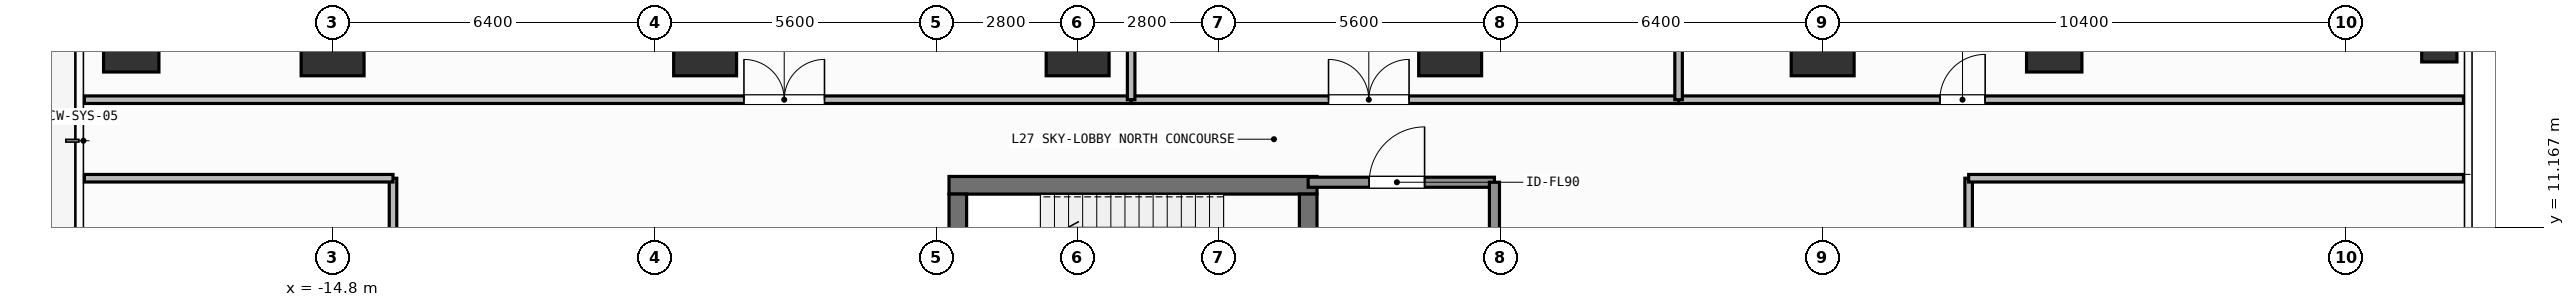
"""IFC4 building model, lengths in metres.
Left out: names, types, materials, properties, quantities, classifications, styles, units other than length and angle.
Written with IfcOpenShell. Run it as: python <this file> out.ifc"""

import sys

from ifc_helpers import new_model, si_unit, direction, frame, frame_2d, origin, origin_2d, place, context, subcontext, project, spatial, rectangle, hollow_rectangle, extrude, element, fill, save


model = new_model("IFC4")
c1 = context("Model", 3, precision=1e-05, world=origin(), true_north=direction((0.0, 1.0)))
c2 = subcontext(c1, "Body", "Model", "MODEL_VIEW")
j1 = project(units=[si_unit("LENGTHUNIT", "METRE"), si_unit("PLANEANGLEUNIT", "RADIAN")], contexts=[c1])
p1 = place(None, origin())
s1 = spatial("IfcSite", under=j1, at=p1, CompositionType="ELEMENT")
p2 = place(p1, origin())
s2 = spatial("IfcBuilding", under=s1, at=p2, CompositionType="ELEMENT")
p3 = place(p2, frame((0.0, 0.0, 108.6)))
s3 = spatial("IfcBuildingStorey", under=s2, at=p3, CompositionType="ELEMENT", Elevation=108.6)
p4 = place(p3, frame((-2.555, 12.0, 0.0), z_axis=(0.0, 0.0, 1.0), x_axis=(1.0, 0.0, 0.0)))
e1 = element("IfcWall", 1, at=p4, inside=s3, PredefinedType="SHEAR", context=c2, shape_type="SweptSolid", body=[
    extrude(rectangle(XDim=7.31, YDim=0.35, at=frame_2d((3.655, 0.0))), origin(), (0.0, 0.0, 1.0), 4.8),
])
p5 = place(p3, frame((-2.38, 8.9, 0.0), z_axis=(0.0, 0.0, 1.0), x_axis=(0.0, 1.0, 0.0)))
e2 = element("IfcWall", 2, at=p5, inside=s3, PredefinedType="SHEAR", context=c2, shape_type="SweptSolid", body=[
    extrude(rectangle(XDim=2.925, YDim=0.35, at=frame_2d((1.462, 0.0))), origin(), (0.0, 0.0, 1.0), 4.8),
])
p6 = place(p3, frame((4.58, 11.825, 0.0), z_axis=(0.0, 0.0, 1.0), x_axis=(0.0, -1.0, 0.0)))
e3 = element("IfcWall", 3, at=p6, inside=s3, PredefinedType="SHEAR", context=c2, shape_type="SweptSolid", body=[
    extrude(rectangle(XDim=2.925, YDim=0.35, at=frame_2d((1.462, 0.0))), origin(), (0.0, 0.0, 1.0), 4.8),
])
p7 = place(p6, frame((0.913, 0.0, 0.0)))
e4 = element("IfcOpeningElement", 4, at=p7, cuts=e3, PredefinedType="OPENING", context=c2, shape_type="SweptSolid", body=[
    extrude(rectangle(XDim=1.1, YDim=2.15, at=frame_2d((0.55, 1.075))), frame((0.0, 0.185, 0.0), z_axis=(0.0, -1.0, 0.0), x_axis=(1.0, 0.0, 0.0)), (0.0, 0.0, 1.0), 0.37),
])
for number, where, z_axis, x_axis in (
    (5, (-14.8, 14.8, 0.0), (0.0, 0.0, 1.0), (1.0, 0.0, 0.0)),
    (6, (-7.4, 14.8, 0.0), (0.0, 0.0, 1.0), (1.0, 0.0, 0.0)),
    (7, (0.0, 14.8, 0.0), (0.0, 0.0, 1.0), (1.0, 0.0, 0.0)),
    (8, (7.4, 14.8, 0.0), (0.0, 0.0, 1.0), (1.0, 0.0, 0.0)),
    (9, (14.8, 14.8, 0.0), (0.0, 0.0, 1.0), (1.0, 0.0, 0.0)),
):
    element("IfcColumn", number, at=place(p3, frame(where, z_axis=z_axis, x_axis=x_axis)), inside=s3, PredefinedType="COLUMN", context=c2, shape_type="SweptSolid", body=[
        extrude(rectangle(XDim=1.25, YDim=1.25, at=origin_2d()), origin(), (0.0, 0.0, 1.0), 4.8),
    ])
for number, where, z_axis, x_axis in (
    (10, (-18.8, 14.8, 0.0), (0.0, 0.0, 1.0), (1.0, 0.0, 0.0)),
    (11, (19.4, 14.8, 0.0), (0.0, 0.0, 1.0), (1.0, 0.0, 0.0)),
):
    element("IfcColumn", number, at=place(p3, frame(where, z_axis=z_axis, x_axis=x_axis)), inside=s3, PredefinedType="COLUMN", context=c2, shape_type="SweptSolid", body=[
        extrude(rectangle(XDim=1.1, YDim=1.1, at=origin_2d()), origin(), (0.0, 0.0, 1.0), 4.8),
    ])
p8 = place(p3, frame((27.05, 14.8, 0.0), z_axis=(0.0, 0.0, 1.0), x_axis=(1.0, 0.0, 0.0)))
e12 = element("IfcColumn", 12, at=p8, inside=s3, PredefinedType="COLUMN", context=c2, shape_type="SweptSolid", body=[
    extrude(hollow_rectangle(XDim=0.7, YDim=0.7, WallThickness=0.032, at=origin_2d()), origin(), (0.0, 0.0, 1.0), 4.8),
])
p9 = place(p3, frame((4.58, 12.06, 0.0), z_axis=(0.0, 0.0, 1.0), x_axis=(1.0, 0.0, 0.0)))
e13 = element("IfcWall", 13, at=p9, inside=s3, PredefinedType="SOLIDWALL", context=c2, shape_type="SweptSolid", body=[
    extrude(rectangle(XDim=3.7, YDim=0.2, at=frame_2d((1.85, 0.0))), origin(), (0.0, 0.0, 1.0), 4.58),
])
p10 = place(p9, frame((1.212, 0.0, 0.0)))
e14 = element("IfcOpeningElement", 14, at=p10, cuts=e13, PredefinedType="OPENING", context=c2, shape_type="SweptSolid", body=[
    extrude(rectangle(XDim=1.1, YDim=2.15, at=frame_2d((0.55, 1.075))), frame((0.0, 0.11, 0.0), z_axis=(0.0, -1.0, 0.0), x_axis=(1.0, 0.0, 0.0)), (0.0, 0.0, 1.0), 0.22),
])
p11 = place(p3, frame((-19.73, 13.7, 0.0), z_axis=(0.0, 0.0, 1.0), x_axis=(1.0, 0.0, 0.0)))
e15 = element("IfcWall", 15, at=p11, inside=s3, PredefinedType="PARTITIONING", context=c2, shape_type="SweptSolid", body=[
    extrude(rectangle(XDim=20.793, YDim=0.15, at=frame_2d((10.396, 0.0))), origin(), (0.0, 0.0, 1.0), 4.58),
])
p12 = place(p11, frame((13.102, 0.0, 0.0)))
e16 = element("IfcOpeningElement", 16, at=p12, cuts=e15, PredefinedType="OPENING", context=c2, shape_type="SweptSolid", body=[
    extrude(rectangle(XDim=1.6, YDim=2.3, at=frame_2d((0.8, 1.15))), frame((0.0, 0.085, 0.0), z_axis=(0.0, -1.0, 0.0), x_axis=(1.0, 0.0, 0.0)), (0.0, 0.0, 1.0), 0.17),
])
p13 = place(p3, frame((1.063, 13.7, 0.0), z_axis=(0.0, 0.0, 1.0), x_axis=(1.0, 0.0, 0.0)))
e17 = element("IfcWall", 17, at=p13, inside=s3, PredefinedType="PARTITIONING", context=c2, shape_type="SweptSolid", body=[
    extrude(rectangle(XDim=10.875, YDim=0.15, at=frame_2d((5.438, 0.0))), origin(), (0.0, 0.0, 1.0), 4.58),
])
p14 = place(p13, frame((3.921, 0.0, 0.0)))
e18 = element("IfcOpeningElement", 18, at=p14, cuts=e17, PredefinedType="OPENING", context=c2, shape_type="SweptSolid", body=[
    extrude(rectangle(XDim=1.6, YDim=2.3, at=frame_2d((0.8, 1.15))), frame((0.0, 0.085, 0.0), z_axis=(0.0, -1.0, 0.0), x_axis=(1.0, 0.0, 0.0)), (0.0, 0.0, 1.0), 0.17),
])
p15 = place(p3, frame((11.938, 13.7, 0.0), z_axis=(0.0, 0.0, 1.0), x_axis=(1.0, 0.0, 0.0)))
e19 = element("IfcWall", 19, at=p15, inside=s3, PredefinedType="PARTITIONING", context=c2, shape_type="SweptSolid", body=[
    extrude(rectangle(XDim=15.592, YDim=0.15, at=frame_2d((7.796, 0.0))), origin(), (0.0, 0.0, 1.0), 4.58),
])
p16 = place(p15, frame((5.19, 0.0, 0.0)))
e20 = element("IfcOpeningElement", 20, at=p16, cuts=e19, PredefinedType="OPENING", context=c2, shape_type="SweptSolid", body=[
    extrude(rectangle(XDim=0.9, YDim=2.1, at=frame_2d((0.45, 1.05))), frame((0.0, 0.085, 0.0), z_axis=(0.0, -1.0, 0.0), x_axis=(1.0, 0.0, 0.0)), (0.0, 0.0, 1.0), 0.17),
])
p17 = place(p3, frame((-13.6, -12.14, 0.0), z_axis=(0.0, 0.0, 1.0), x_axis=(0.0, 1.0, 0.0)))
e21 = element("IfcWall", 21, at=p17, inside=s3, PredefinedType="PARTITIONING", context=c2, shape_type="SweptSolid", body=[
    extrude(rectangle(XDim=24.28, YDim=0.15, at=frame_2d((12.14, 0.0))), origin(), (0.0, 0.0, 1.0), 4.58),
])
p18 = place(p17, frame((11.25, 0.0, 0.0)))
e22 = element("IfcOpeningElement", 22, at=p18, cuts=e21, PredefinedType="OPENING", context=c2, shape_type="SweptSolid", body=[
    extrude(rectangle(XDim=1.6, YDim=2.3, at=frame_2d((0.8, 1.15))), frame((0.0, 0.085, 0.0), z_axis=(0.0, -1.0, 0.0), x_axis=(1.0, 0.0, 0.0)), (0.0, 0.0, 1.0), 0.17),
])
p19 = place(p3, frame((17.7, -12.14, 0.0), z_axis=(0.0, 0.0, 1.0), x_axis=(0.0, 1.0, 0.0)))
e23 = element("IfcWall", 23, at=p19, inside=s3, PredefinedType="PARTITIONING", context=c2, shape_type="SweptSolid", body=[
    extrude(rectangle(XDim=24.28, YDim=0.15, at=frame_2d((12.14, 0.0))), origin(), (0.0, 0.0, 1.0), 4.58),
])
p20 = place(p19, frame((11.25, 0.0, 0.0)))
e24 = element("IfcOpeningElement", 24, at=p20, cuts=e23, PredefinedType="OPENING", context=c2, shape_type="SweptSolid", body=[
    extrude(rectangle(XDim=1.6, YDim=2.3, at=frame_2d((0.8, 1.15))), frame((0.0, 0.085, 0.0), z_axis=(0.0, -1.0, 0.0), x_axis=(1.0, 0.0, 0.0)), (0.0, 0.0, 1.0), 0.17),
])
p21 = place(p3, frame((8.28, 8.875, 0.0), z_axis=(0.0, 0.0, 1.0), x_axis=(0.0, 1.0, 0.0)))
e25 = element("IfcWall", 25, at=p21, inside=s3, PredefinedType="SOLIDWALL", context=c2, shape_type="SweptSolid", body=[
    extrude(rectangle(XDim=3.185, YDim=0.2, at=frame_2d((1.593, 0.0))), origin(), (0.0, 0.0, 1.0), 4.58),
])
for number, where, z_axis, x_axis in (
    (26, (1.063, 13.7, 0.0), (0.0, 0.0, 1.0), (0.0, 1.0, 0.0)),
    (27, (11.938, 13.7, 0.0), (0.0, 0.0, 1.0), (0.0, 1.0, 0.0)),
):
    element("IfcWall", number, at=place(p3, frame(where, z_axis=z_axis, x_axis=x_axis)), inside=s3, PredefinedType="PARTITIONING", context=c2, shape_type="SweptSolid", body=[
        extrude(rectangle(XDim=15.73, YDim=0.15, at=frame_2d((7.865, 0.0))), origin(), (0.0, 0.0, 1.0), 4.58),
    ])
p22 = place(p3, frame((-19.73, 12.14, 0.0), z_axis=(0.0, 0.0, 1.0), x_axis=(1.0, 0.0, 0.0)))
e28 = element("IfcWall", 28, at=p22, inside=s3, PredefinedType="PARTITIONING", context=c2, shape_type="SweptSolid", body=[
    extrude(rectangle(XDim=6.13, YDim=0.15, at=frame_2d((3.065, 0.0))), origin(), (0.0, 0.0, 1.0), 4.58),
])
p23 = place(p3, frame((17.7, 12.14, 0.0), z_axis=(0.0, 0.0, 1.0), x_axis=(1.0, 0.0, 0.0)))
e29 = element("IfcWall", 29, at=p23, inside=s3, PredefinedType="PARTITIONING", context=c2, shape_type="SweptSolid", body=[
    extrude(rectangle(XDim=9.83, YDim=0.15, at=frame_2d((4.915, 0.0))), origin(), (0.0, 0.0, 1.0), 4.58),
])
p24 = place(p10, origin())
e30 = element("IfcDoor", 30, at=p24, inside=s3, OperationType="SINGLE_SWING_RIGHT", PredefinedType="DOOR", context=c2, shape_type="SweptSolid", body=[
    extrude(rectangle(XDim=1.1, YDim=2.15, at=frame_2d((0.55, 1.075))), frame((0.0, 0.025, 0.0), z_axis=(0.0, -1.0, 0.0), x_axis=(1.0, 0.0, 0.0)), (0.0, 0.0, 1.0), 0.05),
])
fill(e14, e30)
p25 = place(p12, origin())
e31 = element("IfcDoor", 31, at=p25, inside=s3, OperationType="SINGLE_SWING_LEFT", PredefinedType="DOOR", context=c2, shape_type="SweptSolid", body=[
    extrude(rectangle(XDim=1.6, YDim=2.3, at=frame_2d((0.8, 1.15))), frame((0.0, 0.025, 0.0), z_axis=(0.0, -1.0, 0.0), x_axis=(1.0, 0.0, 0.0)), (0.0, 0.0, 1.0), 0.05),
])
fill(e16, e31)
p26 = place(p14, origin())
e32 = element("IfcDoor", 32, at=p26, inside=s3, OperationType="SINGLE_SWING_LEFT", PredefinedType="DOOR", context=c2, shape_type="SweptSolid", body=[
    extrude(rectangle(XDim=1.6, YDim=2.3, at=frame_2d((0.8, 1.15))), frame((0.0, 0.025, 0.0), z_axis=(0.0, -1.0, 0.0), x_axis=(1.0, 0.0, 0.0)), (0.0, 0.0, 1.0), 0.05),
])
fill(e18, e32)
p27 = place(p16, origin())
e33 = element("IfcDoor", 33, at=p27, inside=s3, OperationType="SINGLE_SWING_RIGHT", PredefinedType="DOOR", context=c2, shape_type="SweptSolid", body=[
    extrude(rectangle(XDim=0.9, YDim=2.1, at=frame_2d((0.45, 1.05))), frame((0.0, 0.025, 0.0), z_axis=(0.0, -1.0, 0.0), x_axis=(1.0, 0.0, 0.0)), (0.0, 0.0, 1.0), 0.05),
])
fill(e20, e33)
save(model, sys.argv[1])
